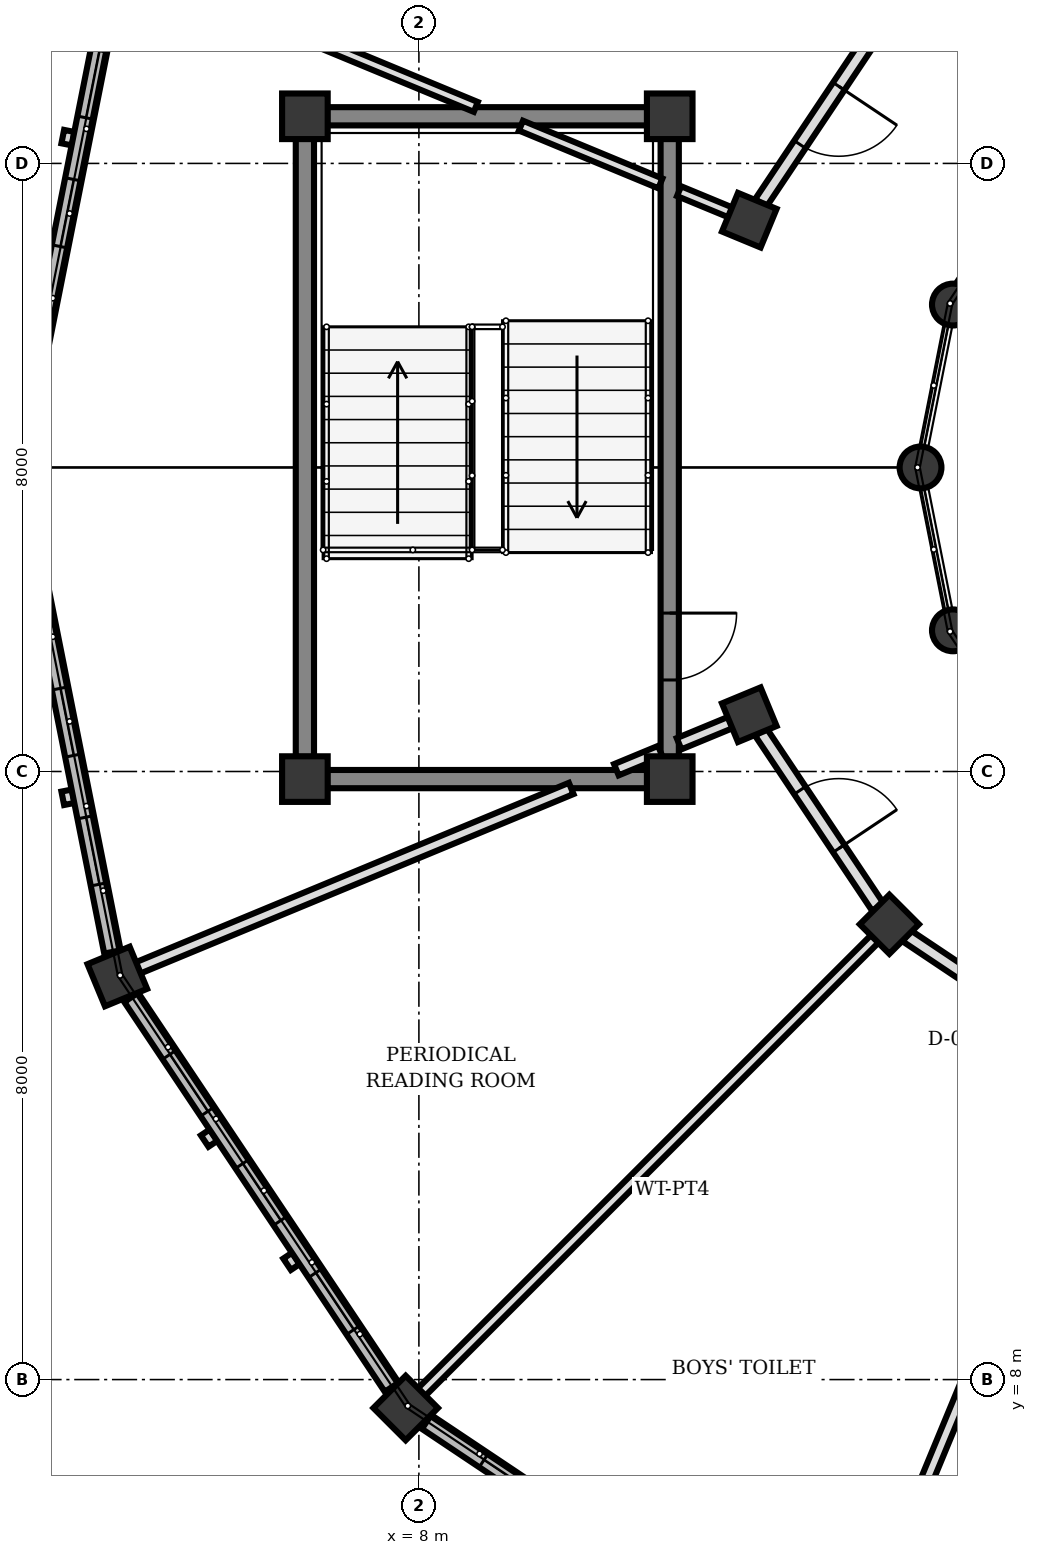
"""IFC4 building model, lengths in metres.
Left out: names, types, materials, properties, quantities, classifications, styles, units other than length and angle.
Written with IfcOpenShell. Run it as: python <this file> out.ifc"""

import sys

from ifc_helpers import new_model, si_unit, direction, frame, frame_2d, origin, origin_2d, place, context, subcontext, project, spatial, rectangle, circle, extrude, element, fill, save


model = new_model("IFC4")
c1 = context("Model", 3, precision=1e-05, world=origin(), true_north=direction((0.0, 1.0)))
c2 = subcontext(c1, "Body", "Model", "MODEL_VIEW")
j1 = project(units=[si_unit("LENGTHUNIT", "METRE"), si_unit("PLANEANGLEUNIT", "RADIAN")], contexts=[c1])
p1 = place(None, origin())
s1 = spatial("IfcSite", under=j1, at=p1, CompositionType="ELEMENT")
p2 = place(p1, origin())
s2 = spatial("IfcBuilding", under=s1, at=p2, CompositionType="ELEMENT")
p3 = place(p2, frame((0.0, 0.0, 8.5)))
s3 = spatial("IfcBuildingStorey", under=s2, at=p3, CompositionType="ELEMENT", Elevation=8.5)
for number, where, z_axis, x_axis in (
    (1, (6.5, 15.9, 0.0), (0.0, 0.0, 1.0), (1.0, 0.0, 0.0)),
    (2, (11.3, 15.9, 0.0), (0.0, 0.0, 1.0), (1.0, 0.0, 0.0)),
    (3, (11.3, 24.62, 0.0), (0.0, 0.0, 1.0), (1.0, 0.0, 0.0)),
    (4, (6.5, 24.62, 0.0), (0.0, 0.0, 1.0), (1.0, 0.0, 0.0)),
):
    element("IfcColumn", number, at=place(p3, frame(where, z_axis=z_axis, x_axis=x_axis)), inside=s3, PredefinedType="COLUMN", context=c2, shape_type="SweptSolid", body=[
        extrude(rectangle(XDim=0.6, YDim=0.6, at=origin_2d()), origin(), (0.0, 0.0, 1.0), 4.0),
    ])
for number, where, z_axis, x_axis in (
    (5, (15.026, 22.143, 0.0), (0.0, 0.0, 1.0), (1.0, 0.0, 0.0)),
    (6, (14.6, 20.0, 0.0), (0.0, 0.0, 1.0), (1.0, 0.0, 0.0)),
    (7, (15.026, 17.857, 0.0), (0.0, 0.0, 1.0), (1.0, 0.0, 0.0)),
):
    element("IfcColumn", number, at=place(p3, frame(where, z_axis=z_axis, x_axis=x_axis)), inside=s3, PredefinedType="COLUMN", context=c2, shape_type="SweptSolid", body=[
        extrude(circle(Radius=0.275, at=origin_2d()), origin(), (0.0, 0.0, 1.0), 4.0),
    ])
for number, where, z_axis, x_axis in (
    (8, (12.347, 23.253, 0.0), (0.0, 0.0, 1.0), (-0.924, 0.383, 0.0)),
    (9, (12.347, 16.747, 0.0), (0.0, 0.0, 1.0), (-0.924, -0.383, 0.0)),
    (10, (14.19, 13.99, 0.0), (0.0, 0.0, 1.0), (-0.707, -0.707, 0.0)),
):
    element("IfcColumn", number, at=place(p3, frame(where, z_axis=z_axis, x_axis=x_axis)), inside=s3, PredefinedType="COLUMN", context=c2, shape_type="SweptSolid", body=[
        extrude(rectangle(XDim=0.55, YDim=0.55, at=origin_2d()), origin(), (0.0, 0.0, 1.0), 4.0),
    ])
for number, where, z_axis, x_axis in (
    (11, (4.032, 13.303, 0.0), (0.0, 0.0, 1.0), (-0.924, -0.383, 0.0)),
    (12, (7.826, 7.626, 0.0), (0.0, 0.0, 1.0), (-0.707, -0.707, 0.0)),
):
    element("IfcColumn", number, at=place(p3, frame(where, z_axis=z_axis, x_axis=x_axis)), inside=s3, PredefinedType="COLUMN", context=c2, shape_type="SweptSolid", body=[
        extrude(rectangle(XDim=0.6, YDim=0.6, at=origin_2d()), origin(), (0.0, 0.0, 1.0), 4.0),
    ])
p4 = place(p3, frame((16.086, 23.73, 0.0), z_axis=(0.0, 0.0, 1.0), x_axis=(-0.555287078904, -0.83165874011, 0.0)))
e13 = element("IfcWall", 13, at=p4, inside=s3, PredefinedType="SOLIDWALL", context=c2, shape_type="SweptSolid", body=[
    extrude(rectangle(XDim=1.632, YDim=0.24, at=frame_2d((0.816, 0.0))), origin(), (0.0, 0.0, 1.0), 3.222),
])
p5 = place(p3, frame((2.764, 20.323, 0.0), z_axis=(0.0, 0.0, 1.0), x_axis=(0.195164813773, 0.980770460131, 0.0)))
e14 = element("IfcWall", 14, at=p5, inside=s3, PredefinedType="SOLIDWALL", context=c2, shape_type="SweptSolid", body=[
    extrude(rectangle(XDim=6.17, YDim=0.22, at=frame_2d((3.085, 0.0))), origin(), (0.0, 0.0, 1.0), 3.172),
])
p6 = place(p5, frame((0.907, 0.0, 0.85)))
e15 = element("IfcOpeningElement", 15, at=p6, cuts=e14, PredefinedType="OPENING", context=c2, shape_type="SweptSolid", body=[
    extrude(rectangle(XDim=0.9, YDim=1.4, at=frame_2d((0.45, 0.7))), frame((0.0, 0.12, 0.0), z_axis=(0.0, -1.0, 0.0), x_axis=(1.0, 0.0, 0.0)), (0.0, 0.0, 1.0), 0.24),
])
p7 = place(p5, frame((2.635, 0.0, 0.85)))
e16 = element("IfcOpeningElement", 16, at=p7, cuts=e14, PredefinedType="OPENING", context=c2, shape_type="SweptSolid", body=[
    extrude(rectangle(XDim=0.9, YDim=1.4, at=frame_2d((0.45, 0.7))), frame((0.0, 0.12, 0.0), z_axis=(0.0, -1.0, 0.0), x_axis=(1.0, 0.0, 0.0)), (0.0, 0.0, 1.0), 0.24),
])
p8 = place(p5, frame((4.362, 0.0, 0.85)))
e17 = element("IfcOpeningElement", 17, at=p8, cuts=e14, PredefinedType="OPENING", context=c2, shape_type="SweptSolid", body=[
    extrude(rectangle(XDim=0.9, YDim=1.4, at=frame_2d((0.45, 0.7))), frame((0.0, 0.12, 0.0), z_axis=(0.0, -1.0, 0.0), x_axis=(1.0, 0.0, 0.0)), (0.0, 0.0, 1.0), 0.24),
])
p9 = place(p3, frame((3.968, 13.626, 0.0), z_axis=(0.0, 0.0, 1.0), x_axis=(-0.195164813773, 0.980770460131, 0.0)))
e18 = element("IfcWall", 18, at=p9, inside=s3, PredefinedType="SOLIDWALL", context=c2, shape_type="SweptSolid", body=[
    extrude(rectangle(XDim=6.17, YDim=0.22, at=frame_2d((3.085, 0.0))), origin(), (0.0, 0.0, 1.0), 3.172),
])
p10 = place(p9, frame((0.907, 0.0, 0.85)))
e19 = element("IfcOpeningElement", 19, at=p10, cuts=e18, PredefinedType="OPENING", context=c2, shape_type="SweptSolid", body=[
    extrude(rectangle(XDim=0.9, YDim=1.4, at=frame_2d((0.45, 0.7))), frame((0.0, 0.12, 0.0), z_axis=(0.0, -1.0, 0.0), x_axis=(1.0, 0.0, 0.0)), (0.0, 0.0, 1.0), 0.24),
])
p11 = place(p9, frame((2.635, 0.0, 0.85)))
e20 = element("IfcOpeningElement", 20, at=p11, cuts=e18, PredefinedType="OPENING", context=c2, shape_type="SweptSolid", body=[
    extrude(rectangle(XDim=0.9, YDim=1.4, at=frame_2d((0.45, 0.7))), frame((0.0, 0.12, 0.0), z_axis=(0.0, -1.0, 0.0), x_axis=(1.0, 0.0, 0.0)), (0.0, 0.0, 1.0), 0.24),
])
p12 = place(p9, frame((4.362, 0.0, 0.85)))
e21 = element("IfcOpeningElement", 21, at=p12, cuts=e18, PredefinedType="OPENING", context=c2, shape_type="SweptSolid", body=[
    extrude(rectangle(XDim=0.9, YDim=1.4, at=frame_2d((0.45, 0.7))), frame((0.0, 0.12, 0.0), z_axis=(0.0, -1.0, 0.0), x_axis=(1.0, 0.0, 0.0)), (0.0, 0.0, 1.0), 0.24),
])
p13 = place(p3, frame((7.643, 7.9, 0.0), z_axis=(0.0, 0.0, 1.0), x_axis=(-0.555658736667, 0.831410469242, 0.0)))
e22 = element("IfcWall", 22, at=p13, inside=s3, PredefinedType="SOLIDWALL", context=c2, shape_type="SweptSolid", body=[
    extrude(rectangle(XDim=6.169, YDim=0.22, at=frame_2d((3.084, 0.0))), origin(), (0.0, 0.0, 1.0), 3.172),
])
p14 = place(p13, frame((0.907, 0.0, 0.85)))
e23 = element("IfcOpeningElement", 23, at=p14, cuts=e22, PredefinedType="OPENING", context=c2, shape_type="SweptSolid", body=[
    extrude(rectangle(XDim=0.9, YDim=1.4, at=frame_2d((0.45, 0.7))), frame((0.0, 0.12, 0.0), z_axis=(0.0, -1.0, 0.0), x_axis=(1.0, 0.0, 0.0)), (0.0, 0.0, 1.0), 0.24),
])
p15 = place(p13, frame((2.635, 0.0, 0.85)))
e24 = element("IfcOpeningElement", 24, at=p15, cuts=e22, PredefinedType="OPENING", context=c2, shape_type="SweptSolid", body=[
    extrude(rectangle(XDim=0.9, YDim=1.4, at=frame_2d((0.45, 0.7))), frame((0.0, 0.12, 0.0), z_axis=(0.0, -1.0, 0.0), x_axis=(1.0, 0.0, 0.0)), (0.0, 0.0, 1.0), 0.24),
])
p16 = place(p13, frame((4.362, 0.0, 0.85)))
e25 = element("IfcOpeningElement", 25, at=p16, cuts=e22, PredefinedType="OPENING", context=c2, shape_type="SweptSolid", body=[
    extrude(rectangle(XDim=0.9, YDim=1.4, at=frame_2d((0.45, 0.7))), frame((0.0, 0.12, 0.0), z_axis=(0.0, -1.0, 0.0), x_axis=(1.0, 0.0, 0.0)), (0.0, 0.0, 1.0), 0.24),
])
p17 = place(p3, frame((13.229, 4.015, 0.0), z_axis=(0.0, 0.0, 1.0), x_axis=(-0.831379966495, 0.555704374025, 0.0)))
e26 = element("IfcWall", 26, at=p17, inside=s3, PredefinedType="SOLIDWALL", context=c2, shape_type="SweptSolid", body=[
    extrude(rectangle(XDim=6.169, YDim=0.22, at=frame_2d((3.084, 0.0))), origin(), (0.0, 0.0, 1.0), 3.172),
])
p18 = place(p17, frame((0.907, 0.0, 0.85)))
e27 = element("IfcOpeningElement", 27, at=p18, cuts=e26, PredefinedType="OPENING", context=c2, shape_type="SweptSolid", body=[
    extrude(rectangle(XDim=0.9, YDim=1.4, at=frame_2d((0.45, 0.7))), frame((0.0, 0.12, 0.0), z_axis=(0.0, -1.0, 0.0), x_axis=(1.0, 0.0, 0.0)), (0.0, 0.0, 1.0), 0.24),
])
p19 = place(p17, frame((2.635, 0.0, 0.85)))
e28 = element("IfcOpeningElement", 28, at=p19, cuts=e26, PredefinedType="OPENING", context=c2, shape_type="SweptSolid", body=[
    extrude(rectangle(XDim=0.9, YDim=1.4, at=frame_2d((0.45, 0.7))), frame((0.0, 0.12, 0.0), z_axis=(0.0, -1.0, 0.0), x_axis=(1.0, 0.0, 0.0)), (0.0, 0.0, 1.0), 0.24),
])
p20 = place(p17, frame((4.362, 0.0, 0.85)))
e29 = element("IfcOpeningElement", 29, at=p20, cuts=e26, PredefinedType="OPENING", context=c2, shape_type="SweptSolid", body=[
    extrude(rectangle(XDim=0.9, YDim=1.4, at=frame_2d((0.45, 0.7))), frame((0.0, 0.12, 0.0), z_axis=(0.0, -1.0, 0.0), x_axis=(1.0, 0.0, 0.0)), (0.0, 0.0, 1.0), 0.24),
])
p21 = place(p3, frame((6.5, 16.192, 0.0), z_axis=(0.0, 0.0, 1.0), x_axis=(0.0, 1.0, 0.0)))
e30 = element("IfcWall", 30, at=p21, inside=s3, PredefinedType="SHEAR", context=c2, shape_type="SweptSolid", body=[
    extrude(rectangle(XDim=8.136, YDim=0.24, at=frame_2d((4.068, 0.0))), origin(), (0.0, 0.0, 1.0), 3.74),
])
p22 = place(p3, frame((11.3, 24.328, 0.0), z_axis=(0.0, 0.0, 1.0), x_axis=(0.0, -1.0, 0.0)))
e31 = element("IfcWall", 31, at=p22, inside=s3, PredefinedType="SHEAR", context=c2, shape_type="SweptSolid", body=[
    extrude(rectangle(XDim=8.136, YDim=0.24, at=frame_2d((4.068, 0.0))), origin(), (0.0, 0.0, 1.0), 3.74),
])
p23 = place(p22, frame((6.244, 0.0, 0.0)))
e32 = element("IfcOpeningElement", 32, at=p23, cuts=e31, PredefinedType="OPENING", context=c2, shape_type="SweptSolid", body=[
    extrude(rectangle(XDim=0.88, YDim=2.1, at=frame_2d((0.44, 1.05))), frame((0.0, 0.13, 0.0), z_axis=(0.0, -1.0, 0.0), x_axis=(1.0, 0.0, 0.0)), (0.0, 0.0, 1.0), 0.26),
])
for number, where, z_axis, x_axis in (
    (33, (11.008, 15.9, 0.0), (0.0, 0.0, 1.0), (-1.0, 0.0, 0.0)),
    (34, (11.008, 24.62, 0.0), (0.0, 0.0, 1.0), (-1.0, 0.0, 0.0)),
):
    element("IfcWall", number, at=place(p3, frame(where, z_axis=z_axis, x_axis=x_axis)), inside=s3, PredefinedType="SHEAR", context=c2, shape_type="SweptSolid", body=[
        extrude(rectangle(XDim=4.216, YDim=0.24, at=frame_2d((2.108, 0.0))), origin(), (0.0, 0.0, 1.0), 3.74),
    ])
p24 = place(p3, frame((12.1, 23.355, 0.0), z_axis=(0.0, 0.0, 1.0), x_axis=(-0.924069600435, 0.382224245113, 0.0)))
e35 = element("IfcWall", 35, at=p24, inside=s3, PredefinedType="PARTITIONING", context=c2, shape_type="SweptSolid", body=[
    extrude(rectangle(XDim=0.733, YDim=0.14, at=frame_2d((0.366, 0.0))), origin(), (0.0, 0.0, 1.0), 3.7),
])
p25 = place(p3, frame((11.177, 23.737, 0.0), z_axis=(0.0, 0.0, 1.0), x_axis=(-0.923817443679, 0.382833293686, 0.0)))
e36 = element("IfcWall", 36, at=p25, inside=s3, PredefinedType="PARTITIONING", context=c2, shape_type="SweptSolid", body=[
    extrude(rectangle(XDim=1.985, YDim=0.14, at=frame_2d((0.993, 0.0))), origin(), (0.0, 0.0, 1.0), 3.7),
])
p26 = place(p3, frame((8.749, 24.743, 0.0), z_axis=(0.0, 0.0, 1.0), x_axis=(-0.923877739946, 0.382687759972, 0.0)))
e37 = element("IfcWall", 37, at=p26, inside=s3, PredefinedType="PARTITIONING", context=c2, shape_type="SweptSolid", body=[
    extrude(rectangle(XDim=4.813, YDim=0.14, at=frame_2d((2.407, 0.0))), origin(), (0.0, 0.0, 1.0), 3.7),
])
p27 = place(p3, frame((12.1, 16.645, 0.0), z_axis=(0.0, 0.0, 1.0), x_axis=(-0.924069600435, -0.382224245113, 0.0)))
e38 = element("IfcWall", 38, at=p27, inside=s3, PredefinedType="PARTITIONING", context=c2, shape_type="SweptSolid", body=[
    extrude(rectangle(XDim=0.733, YDim=0.16, at=frame_2d((0.366, 0.0))), origin(), (0.0, 0.0, 1.0), 3.072),
])
p28 = place(p3, frame((11.177, 16.263, 0.0), z_axis=(0.0, 0.0, 1.0), x_axis=(-0.923812676193, -0.382844797933, 0.0)))
e39 = element("IfcWall", 39, at=p28, inside=s3, PredefinedType="PARTITIONING", context=c2, shape_type="SweptSolid", body=[
    extrude(rectangle(XDim=0.627, YDim=0.16, at=frame_2d((0.313, 0.0))), origin(), (0.0, 0.0, 1.0), 3.072),
])
p29 = place(p3, frame((10.004, 15.777, 0.0), z_axis=(0.0, 0.0, 1.0), x_axis=(-0.923864955254, -0.382718623082, 0.0)))
e40 = element("IfcWall", 40, at=p29, inside=s3, PredefinedType="PARTITIONING", context=c2, shape_type="SweptSolid", body=[
    extrude(rectangle(XDim=6.172, YDim=0.16, at=frame_2d((3.086, 0.0))), origin(), (0.0, 0.0, 1.0), 3.072),
])
p30 = place(p3, frame((14.001, 13.801, 0.0), z_axis=(0.0, 0.0, 1.0), x_axis=(-0.707106781187, -0.707106781187, 0.0)))
e41 = element("IfcWall", 41, at=p30, inside=s3, PredefinedType="PARTITIONING", context=c2, shape_type="SweptSolid", body=[
    extrude(rectangle(XDim=8.441, YDim=0.14, at=frame_2d((4.221, 0.0))), origin(), (0.0, 0.0, 1.0), 3.072),
])
p31 = place(p3, frame((16.845, 11.9, 0.0), z_axis=(0.0, 0.0, 1.0), x_axis=(-0.382683896966, -0.923879340067, 0.0)))
e42 = element("IfcWall", 42, at=p31, inside=s3, PredefinedType="PARTITIONING", context=c2, shape_type="SweptSolid", body=[
    extrude(rectangle(XDim=8.44, YDim=0.16, at=frame_2d((4.22, 0.0))), origin(), (0.0, 0.0, 1.0), 3.072),
])
p32 = place(p3, frame((14.039, 25.784, 0.0), z_axis=(0.0, 0.0, 1.0), x_axis=(-0.555797002478, -0.831318045056, 0.0)))
e43 = element("IfcWall", 43, at=p32, inside=s3, PredefinedType="PARTITIONING", context=c2, shape_type="SweptSolid", body=[
    extrude(rectangle(XDim=2.773, YDim=0.18, at=frame_2d((1.386, 0.0))), origin(), (0.0, 0.0, 1.0), 3.072),
])
p33 = place(p32, frame((0.926, 0.0, 0.0)))
e44 = element("IfcOpeningElement", 44, at=p33, cuts=e43, PredefinedType="OPENING", context=c2, shape_type="SweptSolid", body=[
    extrude(rectangle(XDim=0.92, YDim=2.1, at=frame_2d((0.46, 1.05))), frame((0.0, 0.1, 0.0), z_axis=(0.0, -1.0, 0.0), x_axis=(1.0, 0.0, 0.0)), (0.0, 0.0, 1.0), 0.2),
])
p34 = place(p3, frame((12.498, 16.521, 0.0), z_axis=(0.0, 0.0, 1.0), x_axis=(0.555797002478, -0.831318045056, 0.0)))
e45 = element("IfcWall", 45, at=p34, inside=s3, PredefinedType="PARTITIONING", context=c2, shape_type="SweptSolid", body=[
    extrude(rectangle(XDim=2.773, YDim=0.18, at=frame_2d((1.386, 0.0))), origin(), (0.0, 0.0, 1.0), 3.072),
])
p35 = place(p34, frame((0.926, 0.0, 0.0)))
e46 = element("IfcOpeningElement", 46, at=p35, cuts=e45, PredefinedType="OPENING", context=c2, shape_type="SweptSolid", body=[
    extrude(rectangle(XDim=0.92, YDim=2.1, at=frame_2d((0.46, 1.05))), frame((0.0, 0.1, 0.0), z_axis=(0.0, -1.0, 0.0), x_axis=(1.0, 0.0, 0.0)), (0.0, 0.0, 1.0), 0.2),
])
p36 = place(p3, frame((14.416, 13.839, 0.0), z_axis=(0.0, 0.0, 1.0), x_axis=(0.831318045056, -0.555797002478, 0.0)))
e47 = element("IfcWall", 47, at=p36, inside=s3, PredefinedType="PARTITIONING", context=c2, shape_type="SweptSolid", body=[
    extrude(rectangle(XDim=2.773, YDim=0.18, at=frame_2d((1.386, 0.0))), origin(), (0.0, 0.0, 1.0), 3.072),
])
p37 = place(p36, frame((0.926, 0.0, 0.0)))
e48 = element("IfcOpeningElement", 48, at=p37, cuts=e47, PredefinedType="OPENING", context=c2, shape_type="SweptSolid", body=[
    extrude(rectangle(XDim=0.92, YDim=2.1, at=frame_2d((0.46, 1.05))), frame((0.0, 0.1, 0.0), z_axis=(0.0, -1.0, 0.0), x_axis=(1.0, 0.0, 0.0)), (0.0, 0.0, 1.0), 0.2),
])
p38 = place(p7, origin())
e49 = element("IfcWindow", 49, at=p38, inside=s3, PartitioningType="SINGLE_PANEL", PredefinedType="WINDOW", context=c2, shape_type="SweptSolid", body=[
    extrude(rectangle(XDim=0.9, YDim=1.4, at=frame_2d((0.45, 0.7))), frame((0.0, 0.03, 0.0), z_axis=(0.0, -1.0, 0.0), x_axis=(1.0, 0.0, 0.0)), (0.0, 0.0, 1.0), 0.06),
])
fill(e16, e49)
p39 = place(p8, origin())
e50 = element("IfcWindow", 50, at=p39, inside=s3, PartitioningType="SINGLE_PANEL", PredefinedType="WINDOW", context=c2, shape_type="SweptSolid", body=[
    extrude(rectangle(XDim=0.9, YDim=1.4, at=frame_2d((0.45, 0.7))), frame((0.0, 0.03, 0.0), z_axis=(0.0, -1.0, 0.0), x_axis=(1.0, 0.0, 0.0)), (0.0, 0.0, 1.0), 0.06),
])
fill(e17, e50)
p40 = place(p10, origin())
e51 = element("IfcWindow", 51, at=p40, inside=s3, PartitioningType="SINGLE_PANEL", PredefinedType="WINDOW", context=c2, shape_type="SweptSolid", body=[
    extrude(rectangle(XDim=0.9, YDim=1.4, at=frame_2d((0.45, 0.7))), frame((0.0, 0.03, 0.0), z_axis=(0.0, -1.0, 0.0), x_axis=(1.0, 0.0, 0.0)), (0.0, 0.0, 1.0), 0.06),
])
fill(e19, e51)
p41 = place(p11, origin())
e52 = element("IfcWindow", 52, at=p41, inside=s3, PartitioningType="SINGLE_PANEL", PredefinedType="WINDOW", context=c2, shape_type="SweptSolid", body=[
    extrude(rectangle(XDim=0.9, YDim=1.4, at=frame_2d((0.45, 0.7))), frame((0.0, 0.03, 0.0), z_axis=(0.0, -1.0, 0.0), x_axis=(1.0, 0.0, 0.0)), (0.0, 0.0, 1.0), 0.06),
])
fill(e20, e52)
p42 = place(p14, origin())
e53 = element("IfcWindow", 53, at=p42, inside=s3, PartitioningType="SINGLE_PANEL", PredefinedType="WINDOW", context=c2, shape_type="SweptSolid", body=[
    extrude(rectangle(XDim=0.9, YDim=1.4, at=frame_2d((0.45, 0.7))), frame((0.0, 0.03, 0.0), z_axis=(0.0, -1.0, 0.0), x_axis=(1.0, 0.0, 0.0)), (0.0, 0.0, 1.0), 0.06),
])
fill(e23, e53)
p43 = place(p15, origin())
e54 = element("IfcWindow", 54, at=p43, inside=s3, PartitioningType="SINGLE_PANEL", PredefinedType="WINDOW", context=c2, shape_type="SweptSolid", body=[
    extrude(rectangle(XDim=0.9, YDim=1.4, at=frame_2d((0.45, 0.7))), frame((0.0, 0.03, 0.0), z_axis=(0.0, -1.0, 0.0), x_axis=(1.0, 0.0, 0.0)), (0.0, 0.0, 1.0), 0.06),
])
fill(e24, e54)
p44 = place(p16, origin())
e55 = element("IfcWindow", 55, at=p44, inside=s3, PartitioningType="SINGLE_PANEL", PredefinedType="WINDOW", context=c2, shape_type="SweptSolid", body=[
    extrude(rectangle(XDim=0.9, YDim=1.4, at=frame_2d((0.45, 0.7))), frame((0.0, 0.03, 0.0), z_axis=(0.0, -1.0, 0.0), x_axis=(1.0, 0.0, 0.0)), (0.0, 0.0, 1.0), 0.06),
])
fill(e25, e55)
p45 = place(p20, origin())
e56 = element("IfcWindow", 56, at=p45, inside=s3, PartitioningType="SINGLE_PANEL", PredefinedType="WINDOW", context=c2, shape_type="SweptSolid", body=[
    extrude(rectangle(XDim=0.9, YDim=1.4, at=frame_2d((0.45, 0.7))), frame((0.0, 0.03, 0.0), z_axis=(0.0, -1.0, 0.0), x_axis=(1.0, 0.0, 0.0)), (0.0, 0.0, 1.0), 0.06),
])
fill(e29, e56)
p46 = place(p23, origin())
e57 = element("IfcDoor", 57, at=p46, inside=s3, OperationType="SINGLE_SWING_LEFT", PredefinedType="DOOR", context=c2, shape_type="SweptSolid", body=[
    extrude(rectangle(XDim=0.88, YDim=2.1, at=frame_2d((0.44, 1.05))), frame((0.0, 0.025, 0.0), z_axis=(0.0, -1.0, 0.0), x_axis=(1.0, 0.0, 0.0)), (0.0, 0.0, 1.0), 0.05),
])
fill(e32, e57)
p47 = place(p33, origin())
e58 = element("IfcDoor", 58, at=p47, inside=s3, OperationType="SINGLE_SWING_LEFT", PredefinedType="DOOR", context=c2, shape_type="SweptSolid", body=[
    extrude(rectangle(XDim=0.92, YDim=2.1, at=frame_2d((0.46, 1.05))), frame((0.0, 0.025, 0.0), z_axis=(0.0, -1.0, 0.0), x_axis=(1.0, 0.0, 0.0)), (0.0, 0.0, 1.0), 0.05),
])
fill(e44, e58)
p48 = place(p35, origin())
e59 = element("IfcDoor", 59, at=p48, inside=s3, OperationType="SINGLE_SWING_RIGHT", PredefinedType="DOOR", context=c2, shape_type="SweptSolid", body=[
    extrude(rectangle(XDim=0.92, YDim=2.1, at=frame_2d((0.46, 1.05))), frame((0.0, 0.025, 0.0), z_axis=(0.0, -1.0, 0.0), x_axis=(1.0, 0.0, 0.0)), (0.0, 0.0, 1.0), 0.05),
])
fill(e46, e59)
save(model, sys.argv[1])
